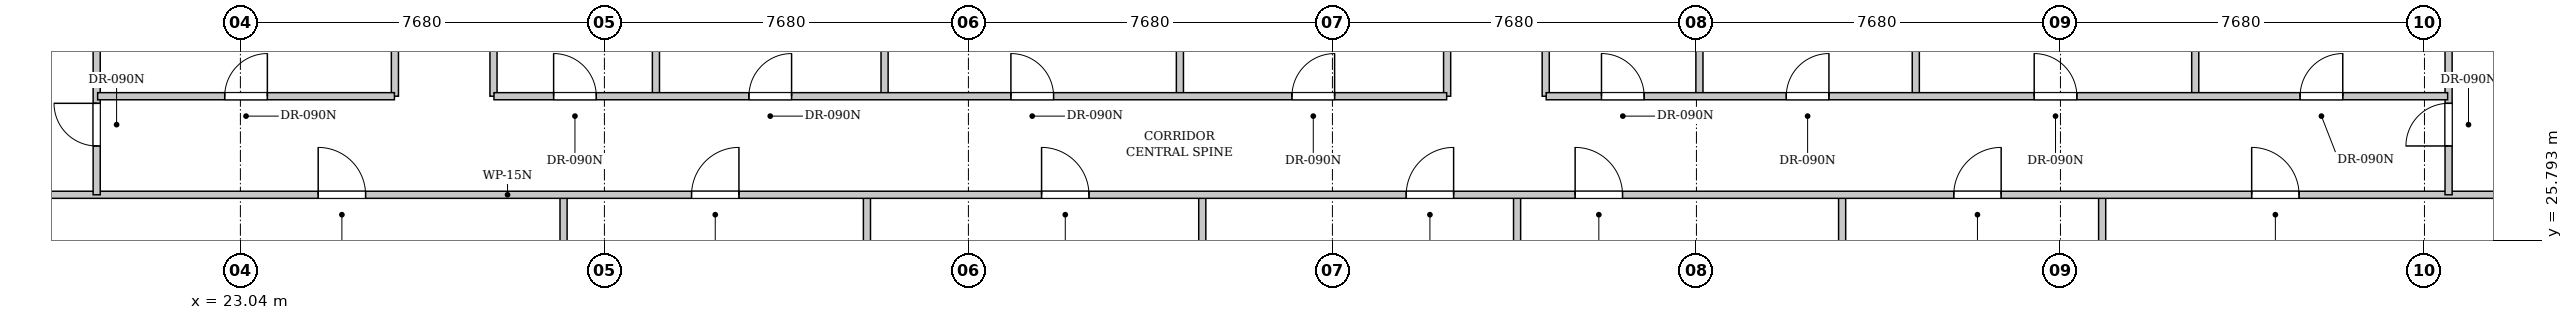
"""IFC4 building model, lengths in metres.
Left out: names, types, materials, properties, quantities, classifications, styles, units other than length and angle.
Written with IfcOpenShell. Run it as: python <this file> out.ifc"""

import sys

from ifc_helpers import new_model, si_unit, direction, frame, frame_2d, origin, place, context, subcontext, project, spatial, rectangle, extrude, element, fill, save


model = new_model("IFC4")
c1 = context("Model", 3, precision=1e-05, world=origin(), true_north=direction((0.0, 1.0)))
c2 = subcontext(c1, "Body", "Model", "MODEL_VIEW")
j1 = project(units=[si_unit("LENGTHUNIT", "METRE"), si_unit("PLANEANGLEUNIT", "RADIAN")], contexts=[c1])
p1 = place(None, origin())
s1 = spatial("IfcSite", under=j1, at=p1, CompositionType="ELEMENT")
p2 = place(p1, origin())
s2 = spatial("IfcBuilding", under=s1, at=p2, CompositionType="ELEMENT")
p3 = place(p2, frame((0.0, 0.0, 106.7)))
s3 = spatial("IfcBuildingStorey", under=s2, at=p3, CompositionType="ELEMENT", Elevation=106.7)
p4 = place(p3, frame((29.858, 9.542, 0.0), z_axis=(0.0, 0.0, 1.0), x_axis=(0.0, 1.0, 0.0)))
e1 = element("IfcWall", 1, at=p4, inside=s3, PredefinedType="PARTITIONING", context=c2, shape_type="SweptSolid", body=[
    extrude(rectangle(XDim=17.229, YDim=0.15, at=frame_2d((8.614, 0.0))), origin(), (0.0, 0.0, 1.0), 2.525),
])
p5 = place(p3, frame((36.259, 10.158, 0.0), z_axis=(0.0, 0.0, 1.0), x_axis=(0.0, 1.0, 0.0)))
e2 = element("IfcWall", 2, at=p5, inside=s3, PredefinedType="PARTITIONING", context=c2, shape_type="SweptSolid", body=[
    extrude(rectangle(XDim=16.612, YDim=0.15, at=frame_2d((8.306, 0.0))), origin(), (0.0, 0.0, 1.0), 2.525),
])
p6 = place(p3, frame((43.334, 10.839, 0.0), z_axis=(0.0, 0.0, 1.0), x_axis=(0.0, 1.0, 0.0)))
e3 = element("IfcWall", 3, at=p6, inside=s3, PredefinedType="PARTITIONING", context=c2, shape_type="SweptSolid", body=[
    extrude(rectangle(XDim=15.931, YDim=0.15, at=frame_2d((7.965, 0.0))), origin(), (0.0, 0.0, 1.0), 2.525),
])
p7 = place(p3, frame((49.976, 11.479, 0.0), z_axis=(0.0, 0.0, 1.0), x_axis=(0.0, 1.0, 0.0)))
e4 = element("IfcWall", 4, at=p7, inside=s3, PredefinedType="PARTITIONING", context=c2, shape_type="SweptSolid", body=[
    extrude(rectangle(XDim=15.291, YDim=0.15, at=frame_2d((7.646, 0.0))), origin(), (0.0, 0.0, 1.0), 3.18),
])
p8 = place(p3, frame((56.834, 12.139, 0.0), z_axis=(0.0, 0.0, 1.0), x_axis=(0.0, 1.0, 0.0)))
e5 = element("IfcWall", 5, at=p8, inside=s3, PredefinedType="PARTITIONING", context=c2, shape_type="SweptSolid", body=[
    extrude(rectangle(XDim=14.631, YDim=0.15, at=frame_2d((7.315, 0.0))), origin(), (0.0, 0.0, 1.0), 3.18),
])
p9 = place(p3, frame((62.32, 12.667, 0.0), z_axis=(0.0, 0.0, 1.0), x_axis=(0.0, 1.0, 0.0)))
e6 = element("IfcWall", 6, at=p9, inside=s3, PredefinedType="PARTITIONING", context=c2, shape_type="SweptSolid", body=[
    extrude(rectangle(XDim=14.103, YDim=0.15, at=frame_2d((7.051, 0.0))), origin(), (0.0, 0.0, 1.0), 3.18),
])
p10 = place(p3, frame((15.208, 26.75, 0.0), z_axis=(0.0, 0.0, 1.0), x_axis=(1.0, 0.0, 0.0)))
e7 = element("IfcWall", 7, at=p10, inside=s3, PredefinedType="PARTITIONING", context=c2, shape_type="SweptSolid", body=[
    extrude(rectangle(XDim=61.222, YDim=0.15, at=frame_2d((30.611, 0.0))), origin(), (0.0, 0.0, 1.0), 2.525),
])
p11 = place(p10, frame((9.474, 0.0, 0.0)))
e8 = element("IfcOpeningElement", 8, at=p11, cuts=e7, PredefinedType="OPENING", context=c2, shape_type="SweptSolid", body=[
    extrude(rectangle(XDim=1.0, YDim=2.15, at=frame_2d((0.5, 1.075))), frame((0.0, 0.085, 0.0), z_axis=(0.0, -1.0, 0.0), x_axis=(1.0, 0.0, 0.0)), (0.0, 0.0, 1.0), 0.17),
])
p12 = place(p10, frame((17.351, 0.0, 0.0)))
e9 = element("IfcOpeningElement", 9, at=p12, cuts=e7, PredefinedType="OPENING", context=c2, shape_type="SweptSolid", body=[
    extrude(rectangle(XDim=1.0, YDim=2.15, at=frame_2d((0.5, 1.075))), frame((0.0, 0.085, 0.0), z_axis=(0.0, -1.0, 0.0), x_axis=(1.0, 0.0, 0.0)), (0.0, 0.0, 1.0), 0.17),
])
p13 = place(p10, frame((24.736, 0.0, 0.0)))
e10 = element("IfcOpeningElement", 10, at=p13, cuts=e7, PredefinedType="OPENING", context=c2, shape_type="SweptSolid", body=[
    extrude(rectangle(XDim=1.0, YDim=2.15, at=frame_2d((0.5, 1.075))), frame((0.0, 0.085, 0.0), z_axis=(0.0, -1.0, 0.0), x_axis=(1.0, 0.0, 0.0)), (0.0, 0.0, 1.0), 0.17),
])
p14 = place(p10, frame((32.429, 0.0, 0.0)))
e11 = element("IfcOpeningElement", 11, at=p14, cuts=e7, PredefinedType="OPENING", context=c2, shape_type="SweptSolid", body=[
    extrude(rectangle(XDim=1.0, YDim=2.15, at=frame_2d((0.5, 1.075))), frame((0.0, 0.085, 0.0), z_axis=(0.0, -1.0, 0.0), x_axis=(1.0, 0.0, 0.0)), (0.0, 0.0, 1.0), 0.17),
])
p15 = place(p10, frame((35.993, 0.0, 0.0)))
e12 = element("IfcOpeningElement", 12, at=p15, cuts=e7, PredefinedType="OPENING", context=c2, shape_type="SweptSolid", body=[
    extrude(rectangle(XDim=1.0, YDim=2.15, at=frame_2d((0.5, 1.075))), frame((0.0, 0.085, 0.0), z_axis=(0.0, -1.0, 0.0), x_axis=(1.0, 0.0, 0.0)), (0.0, 0.0, 1.0), 0.17),
])
p16 = place(p10, frame((43.982, 0.0, 0.0)))
e13 = element("IfcOpeningElement", 13, at=p16, cuts=e7, PredefinedType="OPENING", context=c2, shape_type="SweptSolid", body=[
    extrude(rectangle(XDim=1.0, YDim=2.15, at=frame_2d((0.5, 1.075))), frame((0.0, 0.085, 0.0), z_axis=(0.0, -1.0, 0.0), x_axis=(1.0, 0.0, 0.0)), (0.0, 0.0, 1.0), 0.17),
])
p17 = place(p10, frame((50.267, 0.0, 0.0)))
e14 = element("IfcOpeningElement", 14, at=p17, cuts=e7, PredefinedType="OPENING", context=c2, shape_type="SweptSolid", body=[
    extrude(rectangle(XDim=1.0, YDim=2.15, at=frame_2d((0.5, 1.075))), frame((0.0, 0.085, 0.0), z_axis=(0.0, -1.0, 0.0), x_axis=(1.0, 0.0, 0.0)), (0.0, 0.0, 1.0), 0.17),
])
p18 = place(p3, frame((20.008, 26.75, 0.0), z_axis=(0.0, 0.0, 1.0), x_axis=(0.0, 1.0, 0.0)))
e15 = element("IfcWall", 15, at=p18, inside=s3, PredefinedType="PARTITIONING", context=c2, shape_type="SweptSolid", body=[
    extrude(rectangle(XDim=19.456, YDim=0.15, at=frame_2d((9.728, 0.0))), origin(), (0.0, 0.0, 1.0), 3.18),
])
p19 = place(p18, frame((1.03, 0.0, 0.0)))
e16 = element("IfcOpeningElement", 16, at=p19, cuts=e15, PredefinedType="OPENING", context=c2, shape_type="SweptSolid", body=[
    extrude(rectangle(XDim=0.9, YDim=2.15, at=frame_2d((0.45, 1.075))), frame((0.0, 0.085, 0.0), z_axis=(0.0, -1.0, 0.0), x_axis=(1.0, 0.0, 0.0)), (0.0, 0.0, 1.0), 0.17),
])
p20 = place(p3, frame((69.629, 26.75, 0.0), z_axis=(0.0, 0.0, 1.0), x_axis=(0.0, 1.0, 0.0)))
e17 = element("IfcWall", 17, at=p20, inside=s3, PredefinedType="PARTITIONING", context=c2, shape_type="SweptSolid", body=[
    extrude(rectangle(XDim=24.234, YDim=0.15, at=frame_2d((12.117, 0.0))), origin(), (0.0, 0.0, 1.0), 3.18),
])
p21 = place(p20, frame((1.03, 0.0, 0.0)))
e18 = element("IfcOpeningElement", 18, at=p21, cuts=e17, PredefinedType="OPENING", context=c2, shape_type="SweptSolid", body=[
    extrude(rectangle(XDim=0.9, YDim=2.15, at=frame_2d((0.45, 1.075))), frame((0.0, 0.085, 0.0), z_axis=(0.0, -1.0, 0.0), x_axis=(1.0, 0.0, 0.0)), (0.0, 0.0, 1.0), 0.17),
])
for number, where, z_axis, x_axis in (
    (19, (26.3, 28.83, 0.0), (0.0, 0.0, 1.0), (0.0, 1.0, 0.0)),
    (20, (28.38, 28.83, 0.0), (0.0, 0.0, 1.0), (0.0, 1.0, 0.0)),
    (21, (48.5, 28.83, 0.0), (0.0, 0.0, 1.0), (0.0, 1.0, 0.0)),
    (22, (50.58, 28.83, 0.0), (0.0, 0.0, 1.0), (0.0, 1.0, 0.0)),
):
    element("IfcWall", number, at=place(p3, frame(where, z_axis=z_axis, x_axis=x_axis)), inside=s3, PredefinedType="PARTITIONING", context=c2, shape_type="SweptSolid", body=[
        extrude(rectangle(XDim=4.22, YDim=0.15, at=frame_2d((2.11, 0.0))), origin(), (0.0, 0.0, 1.0), 3.18),
    ])
p22 = place(p3, frame((20.028, 28.83, 0.0), z_axis=(0.0, 0.0, 1.0), x_axis=(1.0, 0.0, 0.0)))
e23 = element("IfcWall", 23, at=p22, inside=s3, PredefinedType="PARTITIONING", context=c2, shape_type="SweptSolid", body=[
    extrude(rectangle(XDim=6.262, YDim=0.15, at=frame_2d((3.131, 0.0))), origin(), (0.0, 0.0, 1.0), 3.18),
])
p23 = place(p22, frame((2.681, 0.0, 0.0)))
e24 = element("IfcOpeningElement", 24, at=p23, cuts=e23, PredefinedType="OPENING", context=c2, shape_type="SweptSolid", body=[
    extrude(rectangle(XDim=0.9, YDim=2.15, at=frame_2d((0.45, 1.075))), frame((0.0, 0.085, 0.0), z_axis=(0.0, -1.0, 0.0), x_axis=(1.0, 0.0, 0.0)), (0.0, 0.0, 1.0), 0.17),
])
for number, where, z_axis, x_axis in (
    (25, (31.807, 28.83, 0.0), (0.0, 0.0, 1.0), (0.0, 1.0, 0.0)),
    (26, (36.631, 28.83, 0.0), (0.0, 0.0, 1.0), (0.0, 1.0, 0.0)),
    (27, (42.862, 28.83, 0.0), (0.0, 0.0, 1.0), (0.0, 1.0, 0.0)),
):
    element("IfcWall", number, at=place(p3, frame(where, z_axis=z_axis, x_axis=x_axis)), inside=s3, PredefinedType="PARTITIONING", context=c2, shape_type="SweptSolid", body=[
        extrude(rectangle(XDim=4.22, YDim=0.15, at=frame_2d((2.11, 0.0))), origin(), (0.0, 0.0, 1.0), 3.18),
    ])
p24 = place(p3, frame((28.39, 28.83, 0.0), z_axis=(0.0, 0.0, 1.0), x_axis=(1.0, 0.0, 0.0)))
e28 = element("IfcWall", 28, at=p24, inside=s3, PredefinedType="PARTITIONING", context=c2, shape_type="SweptSolid", body=[
    extrude(rectangle(XDim=20.1, YDim=0.15, at=frame_2d((10.05, 0.0))), origin(), (0.0, 0.0, 1.0), 3.18),
])
p25 = place(p24, frame((1.259, 0.0, 0.0)))
e29 = element("IfcOpeningElement", 29, at=p25, cuts=e28, PredefinedType="OPENING", context=c2, shape_type="SweptSolid", body=[
    extrude(rectangle(XDim=0.9, YDim=2.15, at=frame_2d((0.45, 1.075))), frame((0.0, 0.085, 0.0), z_axis=(0.0, -1.0, 0.0), x_axis=(1.0, 0.0, 0.0)), (0.0, 0.0, 1.0), 0.17),
])
p26 = place(p24, frame((5.379, 0.0, 0.0)))
e30 = element("IfcOpeningElement", 30, at=p26, cuts=e28, PredefinedType="OPENING", context=c2, shape_type="SweptSolid", body=[
    extrude(rectangle(XDim=0.9, YDim=2.15, at=frame_2d((0.45, 1.075))), frame((0.0, 0.085, 0.0), z_axis=(0.0, -1.0, 0.0), x_axis=(1.0, 0.0, 0.0)), (0.0, 0.0, 1.0), 0.17),
])
p27 = place(p24, frame((10.906, 0.0, 0.0)))
e31 = element("IfcOpeningElement", 31, at=p27, cuts=e28, PredefinedType="OPENING", context=c2, shape_type="SweptSolid", body=[
    extrude(rectangle(XDim=0.9, YDim=2.15, at=frame_2d((0.45, 1.075))), frame((0.0, 0.085, 0.0), z_axis=(0.0, -1.0, 0.0), x_axis=(1.0, 0.0, 0.0)), (0.0, 0.0, 1.0), 0.17),
])
p28 = place(p24, frame((16.836, 0.0, 0.0)))
e32 = element("IfcOpeningElement", 32, at=p28, cuts=e28, PredefinedType="OPENING", context=c2, shape_type="SweptSolid", body=[
    extrude(rectangle(XDim=0.9, YDim=2.15, at=frame_2d((0.45, 1.075))), frame((0.0, 0.085, 0.0), z_axis=(0.0, -1.0, 0.0), x_axis=(1.0, 0.0, 0.0)), (0.0, 0.0, 1.0), 0.17),
])
p29 = place(p3, frame((53.823, 28.83, 0.0), z_axis=(0.0, 0.0, 1.0), x_axis=(0.0, 1.0, 0.0)))
e33 = element("IfcWall", 33, at=p29, inside=s3, PredefinedType="PARTITIONING", context=c2, shape_type="SweptSolid", body=[
    extrude(rectangle(XDim=4.22, YDim=0.15, at=frame_2d((2.11, 0.0))), origin(), (0.0, 0.0, 1.0), 2.525),
])
for number, where, z_axis, x_axis in (
    (34, (58.388, 28.83, 0.0), (0.0, 0.0, 1.0), (0.0, 1.0, 0.0)),
    (35, (64.284, 28.83, 0.0), (0.0, 0.0, 1.0), (0.0, 1.0, 0.0)),
):
    element("IfcWall", number, at=place(p3, frame(where, z_axis=z_axis, x_axis=x_axis)), inside=s3, PredefinedType="PARTITIONING", context=c2, shape_type="SweptSolid", body=[
        extrude(rectangle(XDim=4.22, YDim=0.15, at=frame_2d((2.11, 0.0))), origin(), (0.0, 0.0, 1.0), 3.18),
    ])
p30 = place(p3, frame((50.59, 28.83, 0.0), z_axis=(0.0, 0.0, 1.0), x_axis=(1.0, 0.0, 0.0)))
e36 = element("IfcWall", 36, at=p30, inside=s3, PredefinedType="PARTITIONING", context=c2, shape_type="SweptSolid", body=[
    extrude(rectangle(XDim=19.019, YDim=0.15, at=frame_2d((9.509, 0.0))), origin(), (0.0, 0.0, 1.0), 2.525),
])
p31 = place(p30, frame((1.167, 0.0, 0.0)))
e37 = element("IfcOpeningElement", 37, at=p31, cuts=e36, PredefinedType="OPENING", context=c2, shape_type="SweptSolid", body=[
    extrude(rectangle(XDim=0.9, YDim=2.15, at=frame_2d((0.45, 1.075))), frame((0.0, 0.085, 0.0), z_axis=(0.0, -1.0, 0.0), x_axis=(1.0, 0.0, 0.0)), (0.0, 0.0, 1.0), 0.17),
])
p32 = place(p30, frame((5.065, 0.0, 0.0)))
e38 = element("IfcOpeningElement", 38, at=p32, cuts=e36, PredefinedType="OPENING", context=c2, shape_type="SweptSolid", body=[
    extrude(rectangle(XDim=0.9, YDim=2.15, at=frame_2d((0.45, 1.075))), frame((0.0, 0.085, 0.0), z_axis=(0.0, -1.0, 0.0), x_axis=(1.0, 0.0, 0.0)), (0.0, 0.0, 1.0), 0.17),
])
p33 = place(p30, frame((10.296, 0.0, 0.0)))
e39 = element("IfcOpeningElement", 39, at=p33, cuts=e36, PredefinedType="OPENING", context=c2, shape_type="SweptSolid", body=[
    extrude(rectangle(XDim=0.9, YDim=2.15, at=frame_2d((0.45, 1.075))), frame((0.0, 0.085, 0.0), z_axis=(0.0, -1.0, 0.0), x_axis=(1.0, 0.0, 0.0)), (0.0, 0.0, 1.0), 0.17),
])
p34 = place(p30, frame((15.906, 0.0, 0.0)))
e40 = element("IfcOpeningElement", 40, at=p34, cuts=e36, PredefinedType="OPENING", context=c2, shape_type="SweptSolid", body=[
    extrude(rectangle(XDim=0.9, YDim=2.15, at=frame_2d((0.45, 1.075))), frame((0.0, 0.085, 0.0), z_axis=(0.0, -1.0, 0.0), x_axis=(1.0, 0.0, 0.0)), (0.0, 0.0, 1.0), 0.17),
])
p35 = place(p11, origin())
e41 = element("IfcDoor", 41, at=p35, inside=s3, OperationType="SINGLE_SWING_LEFT", PredefinedType="DOOR", context=c2, shape_type="SweptSolid", body=[
    extrude(rectangle(XDim=1.0, YDim=2.15, at=frame_2d((0.5, 1.075))), frame((0.0, 0.025, 0.0), z_axis=(0.0, -1.0, 0.0), x_axis=(1.0, 0.0, 0.0)), (0.0, 0.0, 1.0), 0.05),
])
fill(e8, e41)
p36 = place(p12, origin())
e42 = element("IfcDoor", 42, at=p36, inside=s3, OperationType="SINGLE_SWING_RIGHT", PredefinedType="DOOR", context=c2, shape_type="SweptSolid", body=[
    extrude(rectangle(XDim=1.0, YDim=2.15, at=frame_2d((0.5, 1.075))), frame((0.0, 0.025, 0.0), z_axis=(0.0, -1.0, 0.0), x_axis=(1.0, 0.0, 0.0)), (0.0, 0.0, 1.0), 0.05),
])
fill(e9, e42)
p37 = place(p13, origin())
e43 = element("IfcDoor", 43, at=p37, inside=s3, OperationType="SINGLE_SWING_LEFT", PredefinedType="DOOR", context=c2, shape_type="SweptSolid", body=[
    extrude(rectangle(XDim=1.0, YDim=2.15, at=frame_2d((0.5, 1.075))), frame((0.0, 0.025, 0.0), z_axis=(0.0, -1.0, 0.0), x_axis=(1.0, 0.0, 0.0)), (0.0, 0.0, 1.0), 0.05),
])
fill(e10, e43)
p38 = place(p14, origin())
e44 = element("IfcDoor", 44, at=p38, inside=s3, OperationType="SINGLE_SWING_RIGHT", PredefinedType="DOOR", context=c2, shape_type="SweptSolid", body=[
    extrude(rectangle(XDim=1.0, YDim=2.15, at=frame_2d((0.5, 1.075))), frame((0.0, 0.025, 0.0), z_axis=(0.0, -1.0, 0.0), x_axis=(1.0, 0.0, 0.0)), (0.0, 0.0, 1.0), 0.05),
])
fill(e11, e44)
p39 = place(p15, origin())
e45 = element("IfcDoor", 45, at=p39, inside=s3, OperationType="SINGLE_SWING_LEFT", PredefinedType="DOOR", context=c2, shape_type="SweptSolid", body=[
    extrude(rectangle(XDim=1.0, YDim=2.15, at=frame_2d((0.5, 1.075))), frame((0.0, 0.025, 0.0), z_axis=(0.0, -1.0, 0.0), x_axis=(1.0, 0.0, 0.0)), (0.0, 0.0, 1.0), 0.05),
])
fill(e12, e45)
p40 = place(p16, origin())
e46 = element("IfcDoor", 46, at=p40, inside=s3, OperationType="SINGLE_SWING_RIGHT", PredefinedType="DOOR", context=c2, shape_type="SweptSolid", body=[
    extrude(rectangle(XDim=1.0, YDim=2.15, at=frame_2d((0.5, 1.075))), frame((0.0, 0.025, 0.0), z_axis=(0.0, -1.0, 0.0), x_axis=(1.0, 0.0, 0.0)), (0.0, 0.0, 1.0), 0.05),
])
fill(e13, e46)
p41 = place(p17, origin())
e47 = element("IfcDoor", 47, at=p41, inside=s3, OperationType="SINGLE_SWING_LEFT", PredefinedType="DOOR", context=c2, shape_type="SweptSolid", body=[
    extrude(rectangle(XDim=1.0, YDim=2.15, at=frame_2d((0.5, 1.075))), frame((0.0, 0.025, 0.0), z_axis=(0.0, -1.0, 0.0), x_axis=(1.0, 0.0, 0.0)), (0.0, 0.0, 1.0), 0.05),
])
fill(e14, e47)
p42 = place(p19, origin())
e48 = element("IfcDoor", 48, at=p42, inside=s3, OperationType="SINGLE_SWING_RIGHT", PredefinedType="DOOR", context=c2, shape_type="SweptSolid", body=[
    extrude(rectangle(XDim=0.9, YDim=2.15, at=frame_2d((0.45, 1.075))), frame((0.0, 0.025, 0.0), z_axis=(0.0, -1.0, 0.0), x_axis=(1.0, 0.0, 0.0)), (0.0, 0.0, 1.0), 0.05),
])
fill(e16, e48)
p43 = place(p21, origin())
e49 = element("IfcDoor", 49, at=p43, inside=s3, OperationType="SINGLE_SWING_LEFT", PredefinedType="DOOR", context=c2, shape_type="SweptSolid", body=[
    extrude(rectangle(XDim=0.9, YDim=2.15, at=frame_2d((0.45, 1.075))), frame((0.0, 0.025, 0.0), z_axis=(0.0, -1.0, 0.0), x_axis=(1.0, 0.0, 0.0)), (0.0, 0.0, 1.0), 0.05),
])
fill(e18, e49)
p44 = place(p23, origin())
e50 = element("IfcDoor", 50, at=p44, inside=s3, OperationType="SINGLE_SWING_RIGHT", PredefinedType="DOOR", context=c2, shape_type="SweptSolid", body=[
    extrude(rectangle(XDim=0.9, YDim=2.15, at=frame_2d((0.45, 1.075))), frame((0.0, 0.025, 0.0), z_axis=(0.0, -1.0, 0.0), x_axis=(1.0, 0.0, 0.0)), (0.0, 0.0, 1.0), 0.05),
])
fill(e24, e50)
p45 = place(p25, origin())
e51 = element("IfcDoor", 51, at=p45, inside=s3, OperationType="SINGLE_SWING_LEFT", PredefinedType="DOOR", context=c2, shape_type="SweptSolid", body=[
    extrude(rectangle(XDim=0.9, YDim=2.15, at=frame_2d((0.45, 1.075))), frame((0.0, 0.025, 0.0), z_axis=(0.0, -1.0, 0.0), x_axis=(1.0, 0.0, 0.0)), (0.0, 0.0, 1.0), 0.05),
])
fill(e29, e51)
p46 = place(p26, origin())
e52 = element("IfcDoor", 52, at=p46, inside=s3, OperationType="SINGLE_SWING_RIGHT", PredefinedType="DOOR", context=c2, shape_type="SweptSolid", body=[
    extrude(rectangle(XDim=0.9, YDim=2.15, at=frame_2d((0.45, 1.075))), frame((0.0, 0.025, 0.0), z_axis=(0.0, -1.0, 0.0), x_axis=(1.0, 0.0, 0.0)), (0.0, 0.0, 1.0), 0.05),
])
fill(e30, e52)
p47 = place(p27, origin())
e53 = element("IfcDoor", 53, at=p47, inside=s3, OperationType="SINGLE_SWING_LEFT", PredefinedType="DOOR", context=c2, shape_type="SweptSolid", body=[
    extrude(rectangle(XDim=0.9, YDim=2.15, at=frame_2d((0.45, 1.075))), frame((0.0, 0.025, 0.0), z_axis=(0.0, -1.0, 0.0), x_axis=(1.0, 0.0, 0.0)), (0.0, 0.0, 1.0), 0.05),
])
fill(e31, e53)
p48 = place(p28, origin())
e54 = element("IfcDoor", 54, at=p48, inside=s3, OperationType="SINGLE_SWING_RIGHT", PredefinedType="DOOR", context=c2, shape_type="SweptSolid", body=[
    extrude(rectangle(XDim=0.9, YDim=2.15, at=frame_2d((0.45, 1.075))), frame((0.0, 0.025, 0.0), z_axis=(0.0, -1.0, 0.0), x_axis=(1.0, 0.0, 0.0)), (0.0, 0.0, 1.0), 0.05),
])
fill(e32, e54)
p49 = place(p31, origin())
e55 = element("IfcDoor", 55, at=p49, inside=s3, OperationType="SINGLE_SWING_LEFT", PredefinedType="DOOR", context=c2, shape_type="SweptSolid", body=[
    extrude(rectangle(XDim=0.9, YDim=2.15, at=frame_2d((0.45, 1.075))), frame((0.0, 0.025, 0.0), z_axis=(0.0, -1.0, 0.0), x_axis=(1.0, 0.0, 0.0)), (0.0, 0.0, 1.0), 0.05),
])
fill(e37, e55)
p50 = place(p32, origin())
e56 = element("IfcDoor", 56, at=p50, inside=s3, OperationType="SINGLE_SWING_RIGHT", PredefinedType="DOOR", context=c2, shape_type="SweptSolid", body=[
    extrude(rectangle(XDim=0.9, YDim=2.15, at=frame_2d((0.45, 1.075))), frame((0.0, 0.025, 0.0), z_axis=(0.0, -1.0, 0.0), x_axis=(1.0, 0.0, 0.0)), (0.0, 0.0, 1.0), 0.05),
])
fill(e38, e56)
p51 = place(p33, origin())
e57 = element("IfcDoor", 57, at=p51, inside=s3, OperationType="SINGLE_SWING_LEFT", PredefinedType="DOOR", context=c2, shape_type="SweptSolid", body=[
    extrude(rectangle(XDim=0.9, YDim=2.15, at=frame_2d((0.45, 1.075))), frame((0.0, 0.025, 0.0), z_axis=(0.0, -1.0, 0.0), x_axis=(1.0, 0.0, 0.0)), (0.0, 0.0, 1.0), 0.05),
])
fill(e39, e57)
p52 = place(p34, origin())
e58 = element("IfcDoor", 58, at=p52, inside=s3, OperationType="SINGLE_SWING_RIGHT", PredefinedType="DOOR", context=c2, shape_type="SweptSolid", body=[
    extrude(rectangle(XDim=0.9, YDim=2.15, at=frame_2d((0.45, 1.075))), frame((0.0, 0.025, 0.0), z_axis=(0.0, -1.0, 0.0), x_axis=(1.0, 0.0, 0.0)), (0.0, 0.0, 1.0), 0.05),
])
fill(e40, e58)
save(model, sys.argv[1])
